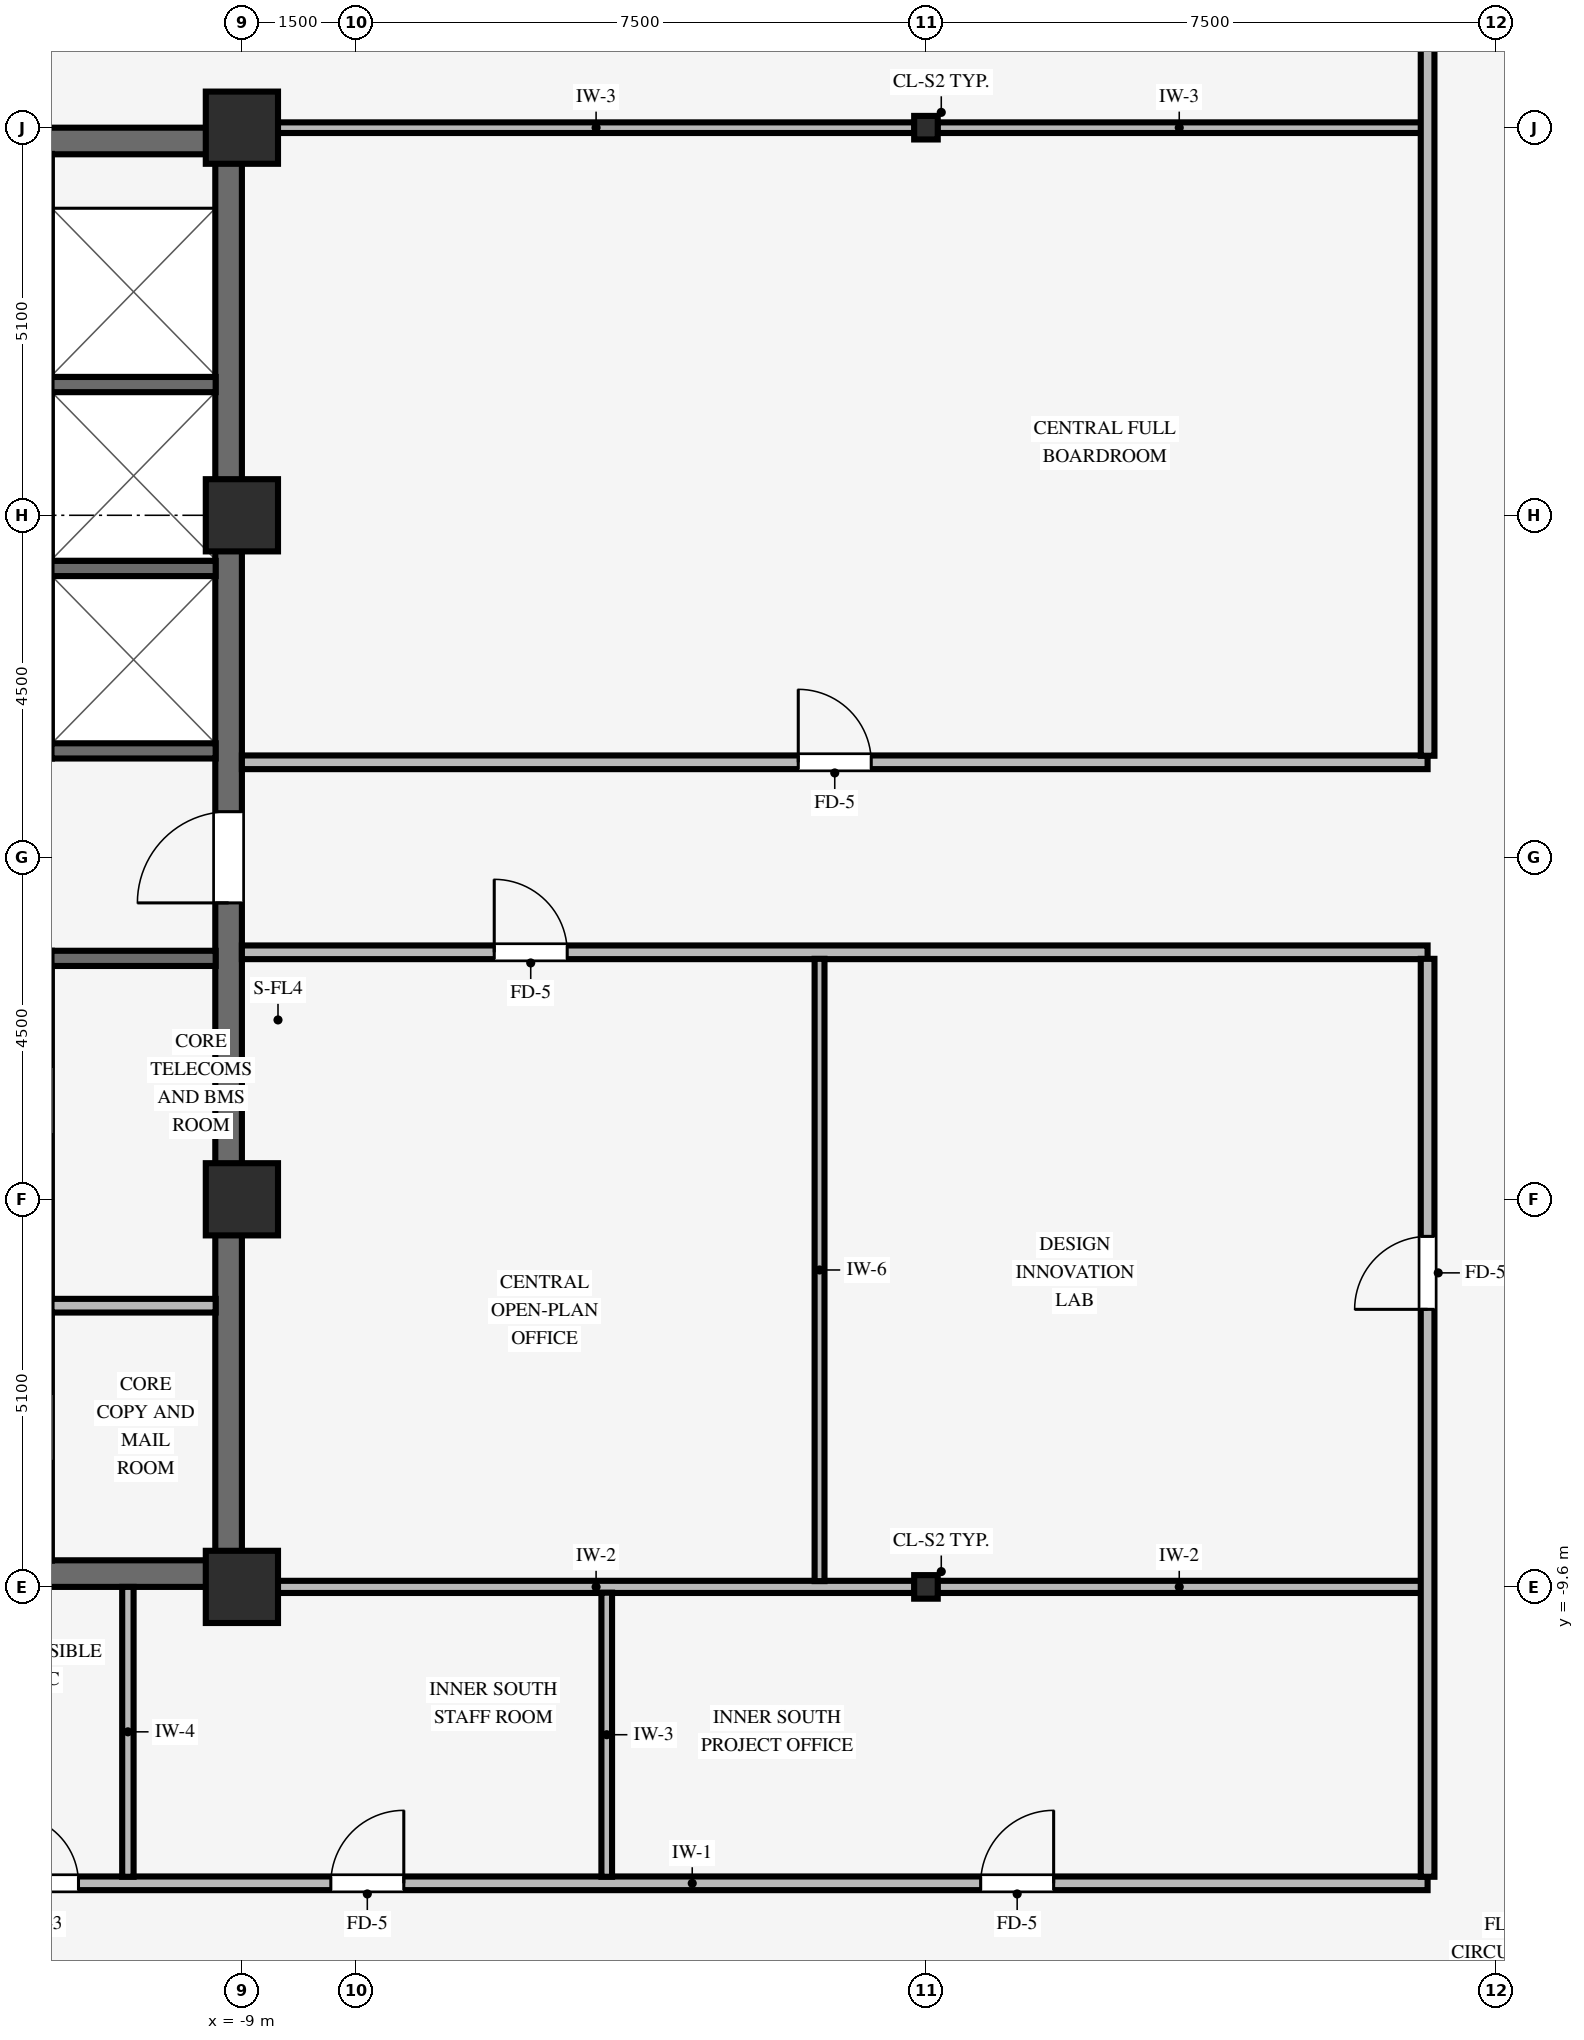
"""IFC4 building model, lengths in metres.
Left out: names, types, materials, properties, quantities, classifications, styles, units other than length and angle.
Written with IfcOpenShell. Run it as: python <this file> out.ifc"""

import sys

from ifc_helpers import new_model, si_unit, direction, frame, frame_2d, origin, origin_2d, place, context, subcontext, project, spatial, rectangle, i_section, extrude, source, transform, mapped, element, fill, save


model = new_model("IFC4")
c1 = context("Model", 3, precision=1e-05, world=origin(), true_north=direction((0.0, 1.0)))
c2 = subcontext(c1, "Body", "Model", "MODEL_VIEW")
j1 = project(units=[si_unit("LENGTHUNIT", "METRE"), si_unit("PLANEANGLEUNIT", "RADIAN")], contexts=[c1])
p1 = place(None, origin())
s1 = spatial("IfcSite", under=j1, at=p1, CompositionType="ELEMENT")
p2 = place(p1, origin())
s2 = spatial("IfcBuilding", under=s1, at=p2, CompositionType="ELEMENT")
p3 = place(p2, frame((0.0, 0.0, 201.85)))
s3 = spatial("IfcBuildingStorey", under=s2, at=p3, CompositionType="ELEMENT", Elevation=201.85)
for number, where, z_axis, x_axis in (
    (1, (-17.5, -9.425, 0.0), (0.0, 0.0, 1.0), (1.0, 0.0, 0.0)),
    (2, (-17.5, 9.425, 0.0), (0.0, 0.0, 1.0), (1.0, 0.0, 0.0)),
):
    element("IfcWall", number, at=place(p3, frame(where, z_axis=z_axis, x_axis=x_axis)), inside=s3, PredefinedType="SHEAR", context=c2, shape_type="SweptSolid", body=[
        extrude(rectangle(XDim=8.5, YDim=0.35, at=frame_2d((4.25, 0.0))), origin(), (0.0, 0.0, 1.0), 3.37),
    ])
p4 = place(p3, frame((-9.175, -9.255, 0.0), z_axis=(0.0, 0.0, 1.0), x_axis=(0.0, 1.0, 0.0)))
e3 = element("IfcWall", 3, at=p4, inside=s3, PredefinedType="SHEAR", context=c2, shape_type="SweptSolid", body=[
    extrude(rectangle(XDim=18.51, YDim=0.35, at=frame_2d((9.255, 0.0))), origin(), (0.0, 0.0, 1.0), 3.37),
])
p5 = place(p4, frame((8.655, 0.0, 0.0)))
e4 = element("IfcOpeningElement", 4, at=p5, cuts=e3, PredefinedType="OPENING", context=c2, shape_type="SweptSolid", body=[
    extrude(rectangle(XDim=1.2, YDim=2.15, at=frame_2d((0.6, 1.075))), frame((0.0, 0.185, 0.0), z_axis=(0.0, -1.0, 0.0), x_axis=(1.0, 0.0, 0.0)), (0.0, 0.0, 1.0), 0.37),
])
for number, where, z_axis, x_axis in (
    (5, (-9.0, -9.6, 0.0), (0.0, 0.0, 1.0), (1.0, 0.0, 0.0)),
    (6, (-9.0, -4.5, 0.0), (0.0, 0.0, 1.0), (1.0, 0.0, 0.0)),
    (7, (-9.0, 4.5, 0.0), (0.0, 0.0, 1.0), (1.0, 0.0, 0.0)),
    (8, (-9.0, 9.6, 0.0), (0.0, 0.0, 1.0), (1.0, 0.0, 0.0)),
):
    element("IfcColumn", number, at=place(p3, frame(where, z_axis=z_axis, x_axis=x_axis)), inside=s3, PredefinedType="COLUMN", context=c2, shape_type="SweptSolid", body=[
        extrude(rectangle(XDim=0.95, YDim=0.95, at=origin_2d()), origin(), (0.0, 0.0, 1.0), 3.37),
    ])
for number, where, z_axis, x_axis in (
    (9, (0.0, -9.6, 0.0), (0.0, 0.0, 1.0), (1.0, 0.0, 0.0)),
    (10, (0.0, 9.6, 0.0), (0.0, 0.0, 1.0), (1.0, 0.0, 0.0)),
):
    element("IfcColumn", number, at=place(p3, frame(where, z_axis=z_axis, x_axis=x_axis)), inside=s3, PredefinedType="COLUMN", context=c2, shape_type="SweptSolid", body=[
        extrude(i_section(OverallWidth=0.31, OverallDepth=0.31, WebThickness=0.015, FlangeThickness=0.015, FilletRadius=0.015, at=origin_2d()), origin(), (0.0, 0.0, 1.0), 3.37),
    ])
p6 = place(p3, frame((-11.505, -1.33, 0.0), z_axis=(0.0, 0.0, 1.0), x_axis=(1.0, 0.0, 0.0)))
e11 = element("IfcWall", 11, at=p6, inside=s3, PredefinedType="SHEAR", context=c2, shape_type="SweptSolid", body=[
    extrude(rectangle(XDim=2.16, YDim=0.2, at=frame_2d((1.08, 0.0))), origin(), (0.0, 0.0, 1.0), 3.37),
])
p7 = place(p3, frame((-11.505, -5.9, 0.0), z_axis=(0.0, 0.0, 1.0), x_axis=(1.0, 0.0, 0.0)))
e12 = element("IfcWall", 12, at=p7, inside=s3, PredefinedType="PARTITIONING", context=c2, shape_type="SweptSolid", body=[
    extrude(rectangle(XDim=2.16, YDim=0.18, at=frame_2d((1.08, 0.0))), origin(), (0.0, 0.0, 1.0), 3.36),
])
for number, where, z_axis, x_axis in (
    (13, (-11.505, 1.4, 0.0), (0.0, 0.0, 1.0), (1.0, 0.0, 0.0)),
    (14, (-11.505, 3.8, 0.0), (0.0, 0.0, 1.0), (1.0, 0.0, 0.0)),
    (15, (-11.505, 6.22, 0.0), (0.0, 0.0, 1.0), (1.0, 0.0, 0.0)),
):
    element("IfcWall", number, at=place(p3, frame(where, z_axis=z_axis, x_axis=x_axis)), inside=s3, PredefinedType="SHEAR", context=c2, shape_type="SweptSolid", body=[
        extrude(rectangle(XDim=2.16, YDim=0.2, at=frame_2d((1.08, 0.0))), origin(), (0.0, 0.0, 1.0), 3.37),
    ])
p8 = place(p3, frame((-17.7, -13.5, 0.0), z_axis=(0.0, 0.0, 1.0), x_axis=(1.0, 0.0, 0.0)))
e16 = element("IfcWall", 16, at=p8, inside=s3, PredefinedType="PARTITIONING", context=c2, shape_type="SweptSolid", body=[
    extrude(rectangle(XDim=24.3, YDim=0.18, at=frame_2d((12.15, 0.0))), origin(), (0.0, 0.0, 1.0), 3.008),
])
p9 = place(p8, frame((18.42, 0.0, 0.0)))
e17 = element("IfcOpeningElement", 17, at=p9, cuts=e16, PredefinedType="OPENING", context=c2, shape_type="SweptSolid", body=[
    extrude(rectangle(XDim=0.96, YDim=2.1, at=frame_2d((0.48, 1.05))), frame((0.0, 0.1, 0.0), z_axis=(0.0, -1.0, 0.0), x_axis=(1.0, 0.0, 0.0)), (0.0, 0.0, 1.0), 0.2),
])
p10 = place(p8, frame((9.87, 0.0, 0.0)))
e18 = element("IfcOpeningElement", 18, at=p10, cuts=e16, PredefinedType="OPENING", context=c2, shape_type="SweptSolid", body=[
    extrude(rectangle(XDim=0.96, YDim=2.1, at=frame_2d((0.48, 1.05))), frame((0.0, 0.1, 0.0), z_axis=(0.0, -1.0, 0.0), x_axis=(1.0, 0.0, 0.0)), (0.0, 0.0, 1.0), 0.2),
])
p11 = place(p8, frame((3.3, 0.0, 0.0)))
e19 = element("IfcOpeningElement", 19, at=p11, cuts=e16, PredefinedType="OPENING", context=c2, shape_type="SweptSolid", body=[
    extrude(rectangle(XDim=0.9, YDim=2.1, at=frame_2d((0.45, 1.05))), frame((0.0, 0.1, 0.0), z_axis=(0.0, -1.0, 0.0), x_axis=(1.0, 0.0, 0.0)), (0.0, 0.0, 1.0), 0.2),
])
p12 = place(p8, frame((5.65, 0.0, 0.0)))
e20 = element("IfcOpeningElement", 20, at=p12, cuts=e16, PredefinedType="OPENING", context=c2, shape_type="SweptSolid", body=[
    extrude(rectangle(XDim=0.9, YDim=2.1, at=frame_2d((0.45, 1.05))), frame((0.0, 0.1, 0.0), z_axis=(0.0, -1.0, 0.0), x_axis=(1.0, 0.0, 0.0)), (0.0, 0.0, 1.0), 0.2),
])
p13 = place(p3, frame((-8.529, -9.6, 0.0), z_axis=(0.0, 0.0, 1.0), x_axis=(1.0, 0.0, 0.0)))
e21 = element("IfcWall", 21, at=p13, inside=s3, PredefinedType="PARTITIONING", context=c2, shape_type="SweptSolid", body=[
    extrude(rectangle(XDim=8.378, YDim=0.16, at=frame_2d((4.189, 0.0))), origin(), (0.0, 0.0, 1.0), 2.405),
])
p14 = place(p3, frame((0.151, -9.6, 0.0), z_axis=(0.0, 0.0, 1.0), x_axis=(1.0, 0.0, 0.0)))
e22 = element("IfcWall", 22, at=p14, inside=s3, PredefinedType="PARTITIONING", context=c2, shape_type="SweptSolid", body=[
    extrude(rectangle(XDim=6.363, YDim=0.16, at=frame_2d((3.182, 0.0))), origin(), (0.0, 0.0, 1.0), 2.405),
])
p15 = place(p3, frame((-9.0, -1.25, 0.0), z_axis=(0.0, 0.0, 1.0), x_axis=(1.0, 0.0, 0.0)))
e23 = element("IfcWall", 23, at=p15, inside=s3, PredefinedType="PARTITIONING", context=c2, shape_type="SweptSolid", body=[
    extrude(rectangle(XDim=15.6, YDim=0.18, at=frame_2d((7.8, 0.0))), origin(), (0.0, 0.0, 1.0), 3.36),
])
p16 = place(p15, frame((3.32, 0.0, 0.0)))
e24 = element("IfcOpeningElement", 24, at=p16, cuts=e23, PredefinedType="OPENING", context=c2, shape_type="SweptSolid", body=[
    extrude(rectangle(XDim=0.96, YDim=2.1, at=frame_2d((0.48, 1.05))), frame((0.0, 0.1, 0.0), z_axis=(0.0, -1.0, 0.0), x_axis=(1.0, 0.0, 0.0)), (0.0, 0.0, 1.0), 0.2),
])
p17 = place(p3, frame((-9.0, 1.25, 0.0), z_axis=(0.0, 0.0, 1.0), x_axis=(1.0, 0.0, 0.0)))
e25 = element("IfcWall", 25, at=p17, inside=s3, PredefinedType="PARTITIONING", context=c2, shape_type="SweptSolid", body=[
    extrude(rectangle(XDim=15.6, YDim=0.18, at=frame_2d((7.8, 0.0))), origin(), (0.0, 0.0, 1.0), 3.36),
])
p18 = place(p17, frame((7.32, 0.0, 0.0)))
e26 = element("IfcOpeningElement", 26, at=p18, cuts=e25, PredefinedType="OPENING", context=c2, shape_type="SweptSolid", body=[
    extrude(rectangle(XDim=0.96, YDim=2.1, at=frame_2d((0.48, 1.05))), frame((0.0, 0.1, 0.0), z_axis=(0.0, -1.0, 0.0), x_axis=(1.0, 0.0, 0.0)), (0.0, 0.0, 1.0), 0.2),
])
p19 = place(p3, frame((-8.529, 9.6, 0.0), z_axis=(0.0, 0.0, 1.0), x_axis=(1.0, 0.0, 0.0)))
e27 = element("IfcWall", 27, at=p19, inside=s3, PredefinedType="PARTITIONING", context=c2, shape_type="SweptSolid", body=[
    extrude(rectangle(XDim=8.378, YDim=0.14, at=frame_2d((4.189, 0.0))), origin(), (0.0, 0.0, 1.0), 2.405),
])
p20 = place(p3, frame((0.151, 9.6, 0.0), z_axis=(0.0, 0.0, 1.0), x_axis=(1.0, 0.0, 0.0)))
e28 = element("IfcWall", 28, at=p20, inside=s3, PredefinedType="PARTITIONING", context=c2, shape_type="SweptSolid", body=[
    extrude(rectangle(XDim=6.363, YDim=0.14, at=frame_2d((3.182, 0.0))), origin(), (0.0, 0.0, 1.0), 2.405),
])
p21 = place(p3, frame((-10.5, -13.414, 0.0), z_axis=(0.0, 0.0, 1.0), x_axis=(0.0, 1.0, 0.0)))
e29 = element("IfcWall", 29, at=p21, inside=s3, PredefinedType="PARTITIONING", context=c2, shape_type="SweptSolid", body=[
    extrude(rectangle(XDim=3.814, YDim=0.15, at=frame_2d((1.907, 0.0))), origin(), (0.0, 0.0, 1.0), 3.36),
])
p22 = place(p3, frame((-4.2, -13.414, 0.0), z_axis=(0.0, 0.0, 1.0), x_axis=(0.0, 1.0, 0.0)))
e30 = element("IfcWall", 30, at=p22, inside=s3, PredefinedType="PARTITIONING", context=c2, shape_type="SweptSolid", body=[
    extrude(rectangle(XDim=3.738, YDim=0.14, at=frame_2d((1.869, 0.0))), origin(), (0.0, 0.0, 1.0), 3.36),
])
p23 = place(p3, frame((-1.4, -9.524, 0.0), z_axis=(0.0, 0.0, 1.0), x_axis=(0.0, 1.0, 0.0)))
e31 = element("IfcWall", 31, at=p23, inside=s3, PredefinedType="PARTITIONING", context=c2, shape_type="SweptSolid", body=[
    extrude(rectangle(XDim=8.188, YDim=0.13, at=frame_2d((4.094, 0.0))), origin(), (0.0, 0.0, 1.0), 3.36),
])
p24 = place(p3, frame((6.6, -13.414, 0.0), z_axis=(0.0, 0.0, 1.0), x_axis=(0.0, 1.0, 0.0)))
e32 = element("IfcWall", 32, at=p24, inside=s3, PredefinedType="PARTITIONING", context=c2, shape_type="SweptSolid", body=[
    extrude(rectangle(XDim=12.078, YDim=0.18, at=frame_2d((6.039, 0.0))), origin(), (0.0, 0.0, 1.0), 3.36),
])
p25 = place(p24, frame((7.466, 0.0, 0.0)))
e33 = element("IfcOpeningElement", 33, at=p25, cuts=e32, PredefinedType="OPENING", context=c2, shape_type="SweptSolid", body=[
    extrude(rectangle(XDim=0.96, YDim=2.1, at=frame_2d((0.48, 1.05))), frame((0.0, 0.1, 0.0), z_axis=(0.0, -1.0, 0.0), x_axis=(1.0, 0.0, 0.0)), (0.0, 0.0, 1.0), 0.2),
])
p26 = place(p3, frame((6.6, 1.336, 0.0), z_axis=(0.0, 0.0, 1.0), x_axis=(0.0, 1.0, 0.0)))
e34 = element("IfcWall", 34, at=p26, inside=s3, PredefinedType="PARTITIONING", context=c2, shape_type="SweptSolid", body=[
    extrude(rectangle(XDim=12.078, YDim=0.18, at=frame_2d((6.039, 0.0))), origin(), (0.0, 0.0, 1.0), 3.36),
])
m1 = source(origin(), c2, "Body", "SweptSolid", [
    extrude(rectangle(XDim=1.2, YDim=2.15, at=frame_2d((0.6, 1.075))), frame((0.0, 0.025, 0.0), z_axis=(0.0, -1.0, 0.0), x_axis=(1.0, 0.0, 0.0)), (0.0, 0.0, 1.0), 0.05),
])
p27 = place(p5, origin())
e35 = element("IfcDoor", 35, at=p27, inside=s3, OperationType="SINGLE_SWING_LEFT", PredefinedType="DOOR", context=c2, shape_type="MappedRepresentation", body=[
    mapped(m1, transform((0.0, 0.0, 0.0), scale=1.0)),
])
fill(e4, e35)
m2 = source(origin(), c2, "Body", "SweptSolid", [
    extrude(rectangle(XDim=0.96, YDim=2.1, at=frame_2d((0.48, 1.05))), frame((0.0, 0.025, 0.0), z_axis=(0.0, -1.0, 0.0), x_axis=(1.0, 0.0, 0.0)), (0.0, 0.0, 1.0), 0.05),
])
p28 = place(p18, origin())
e36 = element("IfcDoor", 36, at=p28, inside=s3, OperationType="SINGLE_SWING_LEFT", PredefinedType="DOOR", context=c2, shape_type="MappedRepresentation", body=[
    mapped(m2, transform((0.0, 0.0, 0.0), scale=1.0)),
])
fill(e26, e36)
p29 = place(p9, origin())
e37 = element("IfcDoor", 37, at=p29, inside=s3, OperationType="SINGLE_SWING_RIGHT", PredefinedType="DOOR", context=c2, shape_type="MappedRepresentation", body=[
    mapped(m2, transform((0.0, 0.0, 0.0), scale=1.0)),
])
fill(e17, e37)
p30 = place(p25, origin())
e38 = element("IfcDoor", 38, at=p30, inside=s3, OperationType="SINGLE_SWING_LEFT", PredefinedType="DOOR", context=c2, shape_type="MappedRepresentation", body=[
    mapped(m2, transform((0.0, 0.0, 0.0), scale=1.0)),
])
fill(e33, e38)
p31 = place(p16, origin())
e39 = element("IfcDoor", 39, at=p31, inside=s3, OperationType="SINGLE_SWING_LEFT", PredefinedType="DOOR", context=c2, shape_type="MappedRepresentation", body=[
    mapped(m2, transform((0.0, 0.0, 0.0), scale=1.0)),
])
fill(e24, e39)
p32 = place(p10, origin())
e40 = element("IfcDoor", 40, at=p32, inside=s3, OperationType="SINGLE_SWING_RIGHT", PredefinedType="DOOR", context=c2, shape_type="MappedRepresentation", body=[
    mapped(m2, transform((0.0, 0.0, 0.0), scale=1.0)),
])
fill(e18, e40)
m3 = source(origin(), c2, "Body", "SweptSolid", [
    extrude(rectangle(XDim=0.9, YDim=2.1, at=frame_2d((0.45, 1.05))), frame((0.0, 0.025, 0.0), z_axis=(0.0, -1.0, 0.0), x_axis=(1.0, 0.0, 0.0)), (0.0, 0.0, 1.0), 0.05),
])
p33 = place(p12, origin())
e41 = element("IfcDoor", 41, at=p33, inside=s3, OperationType="SINGLE_SWING_LEFT", PredefinedType="DOOR", context=c2, shape_type="MappedRepresentation", body=[
    mapped(m3, transform((0.0, 0.0, 0.0), scale=1.0)),
])
fill(e20, e41)
save(model, sys.argv[1])
